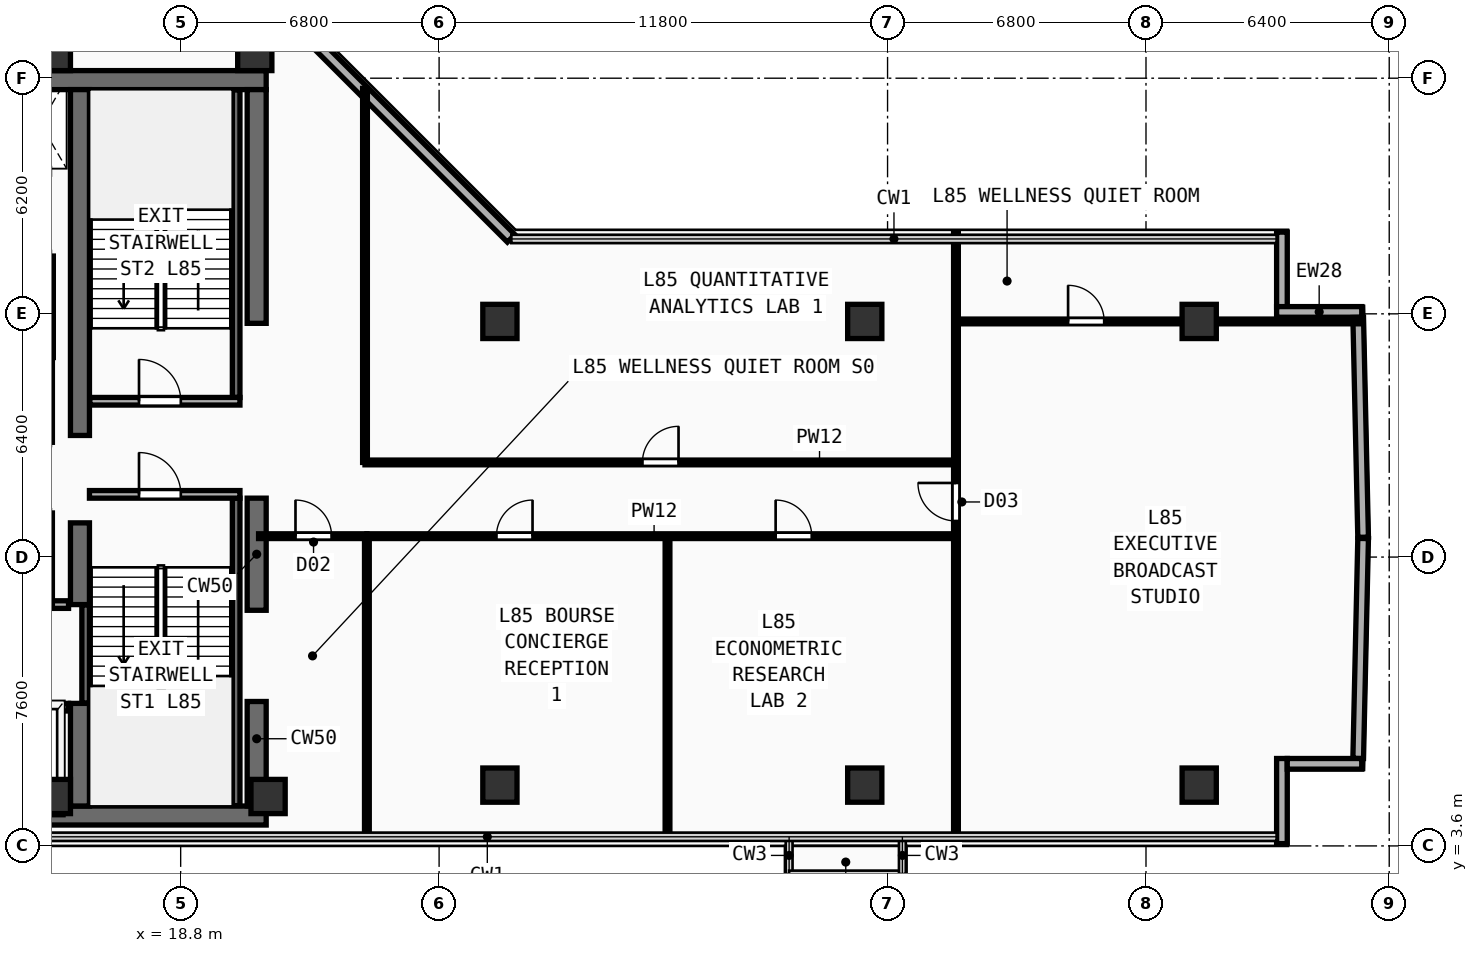
"""IFC4 building model, lengths in metres.
Left out: names, types, materials, properties, quantities, classifications, styles, units other than length and angle.
Written with IfcOpenShell. Run it as: python <this file> out.ifc"""

import sys

from ifc_helpers import new_model, si_unit, direction, frame, frame_2d, origin, origin_2d, place, context, subcontext, project, spatial, rectangle, extrude, element, fill, save


model = new_model("IFC4")
c1 = context("Model", 3, precision=1e-05, world=origin(), true_north=direction((0.0, 1.0)))
c2 = subcontext(c1, "Body", "Model", "MODEL_VIEW")
j1 = project(units=[si_unit("LENGTHUNIT", "METRE"), si_unit("PLANEANGLEUNIT", "RADIAN")], contexts=[c1])
p1 = place(None, origin())
s1 = spatial("IfcSite", under=j1, at=p1, CompositionType="ELEMENT")
p2 = place(p1, origin())
s2 = spatial("IfcBuilding", under=s1, at=p2, CompositionType="ELEMENT")
p3 = place(p2, frame((0.0, 0.0, 331.2)))
s3 = spatial("IfcBuildingStorey", under=s2, at=p3, CompositionType="ELEMENT", Elevation=331.2)
for number, where, z_axis, x_axis in (
    (1, (7.2, 4.4, 0.0), (0.0, 0.0, 1.0), (1.0, 0.0, 0.0)),
    (2, (7.2, 23.75, 0.0), (0.0, 0.0, 1.0), (1.0, 0.0, 0.0)),
):
    element("IfcWall", number, at=place(p3, frame(where, z_axis=z_axis, x_axis=x_axis)), inside=s3, PredefinedType="SHEAR", context=c2, shape_type="SweptSolid", body=[
        extrude(rectangle(XDim=13.85, YDim=0.5, at=frame_2d((6.925, 0.0))), origin(), (0.0, 0.0, 1.0), 3.56),
    ])
p4 = place(p3, frame((20.8, 4.65, 0.0), z_axis=(0.0, 0.0, 1.0), x_axis=(0.0, 1.0, 0.0)))
e3 = element("IfcWall", 3, at=p4, inside=s3, PredefinedType="SHEAR", context=c2, shape_type="SweptSolid", body=[
    extrude(rectangle(XDim=2.75, YDim=0.5, at=frame_2d((1.375, 0.0))), origin(), (0.0, 0.0, 1.0), 3.56),
])
p5 = place(p3, frame((20.8, 9.8, 0.0), z_axis=(0.0, 0.0, 1.0), x_axis=(0.0, 1.0, 0.0)))
e4 = element("IfcWall", 4, at=p5, inside=s3, PredefinedType="SHEAR", context=c2, shape_type="SweptSolid", body=[
    extrude(rectangle(XDim=2.95, YDim=0.5, at=frame_2d((1.475, 0.0))), origin(), (0.0, 0.0, 1.0), 3.56),
])
p6 = place(p3, frame((20.8, 17.35, 0.0), z_axis=(0.0, 0.0, 1.0), x_axis=(0.0, 1.0, 0.0)))
e5 = element("IfcWall", 5, at=p6, inside=s3, PredefinedType="SHEAR", context=c2, shape_type="SweptSolid", body=[
    extrude(rectangle(XDim=6.15, YDim=0.5, at=frame_2d((3.075, 0.0))), origin(), (0.0, 0.0, 1.0), 3.56),
])
p7 = place(p3, frame((16.15, 4.65, 0.0), z_axis=(0.0, 0.0, 1.0), x_axis=(0.0, 1.0, 0.0)))
e6 = element("IfcWall", 6, at=p7, inside=s3, PredefinedType="SHEAR", context=c2, shape_type="SweptSolid", body=[
    extrude(rectangle(XDim=2.7, YDim=0.5, at=frame_2d((1.35, 0.0))), origin(), (0.0, 0.0, 1.0), 3.56),
])
p8 = place(p3, frame((16.15, 9.95, 0.0), z_axis=(0.0, 0.0, 1.0), x_axis=(0.0, 1.0, 0.0)))
e7 = element("IfcWall", 7, at=p8, inside=s3, PredefinedType="SHEAR", context=c2, shape_type="SweptSolid", body=[
    extrude(rectangle(XDim=2.15, YDim=0.5, at=frame_2d((1.075, 0.0))), origin(), (0.0, 0.0, 1.0), 3.56),
])
p9 = place(p3, frame((16.15, 14.4, 0.0), z_axis=(0.0, 0.0, 1.0), x_axis=(0.0, 1.0, 0.0)))
e8 = element("IfcWall", 8, at=p9, inside=s3, PredefinedType="SHEAR", context=c2, shape_type="SweptSolid", body=[
    extrude(rectangle(XDim=9.1, YDim=0.5, at=frame_2d((4.55, 0.0))), origin(), (0.0, 0.0, 1.0), 3.56),
])
for number, where, z_axis, x_axis in (
    (9, (15.45, 4.9, 0.0), (0.0, 0.0, 1.0), (1.0, 0.0, 0.0)),
    (10, (21.1, 4.9, 0.0), (0.0, 0.0, 1.0), (1.0, 0.0, 0.0)),
    (11, (15.45, 24.45, 0.0), (0.0, 0.0, 1.0), (1.0, 0.0, 0.0)),
    (12, (20.75, 24.45, 0.0), (0.0, 0.0, 1.0), (1.0, 0.0, 0.0)),
    (13, (27.2, 5.2, 0.0), (0.0, 0.0, 1.0), (1.0, 0.0, 0.0)),
    (14, (36.8, 5.2, 0.0), (0.0, 0.0, 1.0), (1.0, 0.0, 0.0)),
    (15, (45.6, 5.2, 0.0), (0.0, 0.0, 1.0), (1.0, 0.0, 0.0)),
    (16, (27.2, 17.4, 0.0), (0.0, 0.0, 1.0), (1.0, 0.0, 0.0)),
    (17, (36.8, 17.4, 0.0), (0.0, 0.0, 1.0), (1.0, 0.0, 0.0)),
    (18, (45.6, 17.4, 0.0), (0.0, 0.0, 1.0), (1.0, 0.0, 0.0)),
):
    element("IfcColumn", number, at=place(p3, frame(where, z_axis=z_axis, x_axis=x_axis)), inside=s3, PredefinedType="COLUMN", context=c2, shape_type="SweptSolid", body=[
        extrude(rectangle(XDim=0.9, YDim=0.9, at=origin_2d()), origin(), (0.0, 0.0, 1.0), 3.56),
    ])
p10 = place(p3, frame((47.777, 3.66, 0.0), z_axis=(0.0, 0.0, 1.0), x_axis=(0.0, 1.0, 0.0)))
e19 = element("IfcWall", 19, at=p10, inside=s3, PredefinedType="SOLIDWALL", context=c2, shape_type="SweptSolid", body=[
    extrude(rectangle(XDim=2.24, YDim=0.28, at=frame_2d((1.12, 0.0))), origin(), (0.0, 0.0, 1.0), 3.56),
])
p11 = place(p3, frame((47.917, 5.76, 0.0), z_axis=(0.0, 0.0, 1.0), x_axis=(1.0, 0.0, 0.0)))
e20 = element("IfcWall", 20, at=p11, inside=s3, PredefinedType="SOLIDWALL", context=c2, shape_type="SweptSolid", body=[
    extrude(rectangle(XDim=1.96, YDim=0.28, at=frame_2d((0.98, 0.0))), origin(), (0.0, 0.0, 1.0), 3.56),
])
p12 = place(p3, frame((47.777, 17.775, 0.0), z_axis=(0.0, 0.0, 1.0), x_axis=(0.0, 1.0, 0.0)))
e21 = element("IfcWall", 21, at=p12, inside=s3, PredefinedType="SOLIDWALL", context=c2, shape_type="SweptSolid", body=[
    extrude(rectangle(XDim=1.975, YDim=0.28, at=frame_2d((0.988, 0.0))), origin(), (0.0, 0.0, 1.0), 3.56),
])
p13 = place(p3, frame((47.637, 17.65, 0.0), z_axis=(0.0, 0.0, 1.0), x_axis=(1.0, 0.0, 0.0)))
e22 = element("IfcWall", 22, at=p13, inside=s3, PredefinedType="SOLIDWALL", context=c2, shape_type="SweptSolid", body=[
    extrude(rectangle(XDim=2.24, YDim=0.28, at=frame_2d((1.12, 0.0))), origin(), (0.0, 0.0, 1.0), 3.56),
])
p14 = place(p3, frame((27.496, 19.585, 0.0), z_axis=(0.0, 0.0, 1.0), x_axis=(-0.707106781187, 0.707106781187, 0.0)))
e23 = element("IfcWall", 23, at=p14, inside=s3, PredefinedType="SOLIDWALL", context=c2, shape_type="SweptSolid", body=[
    extrude(rectangle(XDim=9.207, YDim=0.28, at=frame_2d((4.603, 0.0))), origin(), (0.0, 0.0, 1.0), 3.56),
])
p15 = place(p3, frame((49.784, 5.904, 0.0), z_axis=(0.0, 0.0, 1.0), x_axis=(0.022361051613, 0.999749960425, 0.0)))
e24 = element("IfcWall", 24, at=p15, inside=s3, PredefinedType="SOLIDWALL", context=c2, shape_type="SweptSolid", body=[
    extrude(rectangle(XDim=5.787, YDim=0.28, at=frame_2d((2.893, 0.0))), origin(), (0.0, 0.0, 1.0), 3.56),
])
p16 = place(p3, frame((49.913, 11.722, 0.0), z_axis=(0.0, 0.0, 1.0), x_axis=(-0.022360108461, 0.99974998152, 0.0)))
e25 = element("IfcWall", 25, at=p16, inside=s3, PredefinedType="SOLIDWALL", context=c2, shape_type="SweptSolid", body=[
    extrude(rectangle(XDim=5.787, YDim=0.28, at=frame_2d((2.894, 0.0))), origin(), (0.0, 0.0, 1.0), 3.56),
])
p17 = place(p3, frame((16.3, 7.36, 0.0), z_axis=(0.0, 0.0, 1.0), x_axis=(0.0, 1.0, 0.0)))
e26 = element("IfcWall", 26, at=p17, inside=s3, PredefinedType="SHEAR", context=c2, shape_type="SweptSolid", body=[
    extrude(rectangle(XDim=2.58, YDim=0.2, at=frame_2d((1.29, 0.0))), origin(), (0.0, 0.0, 1.0), 3.56),
])
p18 = place(p3, frame((20.26, 4.66, 0.0), z_axis=(0.0, 0.0, 1.0), x_axis=(0.0, 1.0, 0.0)))
e27 = element("IfcWall", 27, at=p18, inside=s3, PredefinedType="SHEAR", context=c2, shape_type="SweptSolid", body=[
    extrude(rectangle(XDim=8.09, YDim=0.2, at=frame_2d((4.045, 0.0))), origin(), (0.0, 0.0, 1.0), 3.56),
])
p19 = place(p3, frame((16.4, 12.85, 0.0), z_axis=(0.0, 0.0, 1.0), x_axis=(1.0, 0.0, 0.0)))
e28 = element("IfcWall", 28, at=p19, inside=s3, PredefinedType="PARTITIONING", context=c2, shape_type="SweptSolid", body=[
    extrude(rectangle(XDim=3.96, YDim=0.2, at=frame_2d((1.98, 0.0))), origin(), (0.0, 0.0, 1.0), 3.56),
])
p20 = place(p19, frame((1.304, 0.0, 0.0)))
e29 = element("IfcOpeningElement", 29, at=p20, cuts=e28, PredefinedType="OPENING", context=c2, shape_type="SweptSolid", body=[
    extrude(rectangle(XDim=1.1, YDim=2.2, at=frame_2d((0.55, 1.1))), frame((0.0, 0.11, 0.0), z_axis=(0.0, -1.0, 0.0), x_axis=(1.0, 0.0, 0.0)), (0.0, 0.0, 1.0), 0.22),
])
p21 = place(p3, frame((20.26, 15.4, 0.0), z_axis=(0.0, 0.0, 1.0), x_axis=(0.0, 1.0, 0.0)))
e30 = element("IfcWall", 30, at=p21, inside=s3, PredefinedType="SHEAR", context=c2, shape_type="SweptSolid", body=[
    extrude(rectangle(XDim=8.09, YDim=0.2, at=frame_2d((4.045, 0.0))), origin(), (0.0, 0.0, 1.0), 3.56),
])
p22 = place(p3, frame((16.41, 15.3, 0.0), z_axis=(0.0, 0.0, 1.0), x_axis=(1.0, 0.0, 0.0)))
e31 = element("IfcWall", 31, at=p22, inside=s3, PredefinedType="PARTITIONING", context=c2, shape_type="SweptSolid", body=[
    extrude(rectangle(XDim=3.95, YDim=0.2, at=frame_2d((1.975, 0.0))), origin(), (0.0, 0.0, 1.0), 3.56),
])
p23 = place(p22, frame((1.294, 0.0, 0.0)))
e32 = element("IfcOpeningElement", 32, at=p23, cuts=e31, PredefinedType="OPENING", context=c2, shape_type="SweptSolid", body=[
    extrude(rectangle(XDim=1.1, YDim=2.2, at=frame_2d((0.55, 1.1))), frame((0.0, 0.11, 0.0), z_axis=(0.0, -1.0, 0.0), x_axis=(1.0, 0.0, 0.0)), (0.0, 0.0, 1.0), 0.22),
])
p24 = place(p3, frame((7.5, 7.25, 0.0), z_axis=(0.0, 0.0, 1.0), x_axis=(1.0, 0.0, 0.0)))
e33 = element("IfcWall", 33, at=p24, inside=s3, PredefinedType="PARTITIONING", context=c2, shape_type="SweptSolid", body=[
    extrude(rectangle(XDim=8.35, YDim=0.2, at=frame_2d((4.175, 0.0))), origin(), (0.0, 0.0, 1.0), 3.56),
])
p25 = place(p24, frame((0.53, 0.0, 0.0)))
e34 = element("IfcOpeningElement", 34, at=p25, cuts=e33, PredefinedType="OPENING", context=c2, shape_type="SweptSolid", body=[
    extrude(rectangle(XDim=1.1, YDim=2.2, at=frame_2d((0.55, 1.1))), frame((0.0, 0.11, 0.0), z_axis=(0.0, -1.0, 0.0), x_axis=(1.0, 0.0, 0.0)), (0.0, 0.0, 1.0), 0.22),
])
p26 = place(p24, frame((2.37, 0.0, 0.0)))
e35 = element("IfcOpeningElement", 35, at=p26, cuts=e33, PredefinedType="OPENING", context=c2, shape_type="SweptSolid", body=[
    extrude(rectangle(XDim=1.1, YDim=2.2, at=frame_2d((0.55, 1.1))), frame((0.0, 0.11, 0.0), z_axis=(0.0, -1.0, 0.0), x_axis=(1.0, 0.0, 0.0)), (0.0, 0.0, 1.0), 0.22),
])
p27 = place(p24, frame((4.33, 0.0, 0.0)))
e36 = element("IfcOpeningElement", 36, at=p27, cuts=e33, PredefinedType="OPENING", context=c2, shape_type="SweptSolid", body=[
    extrude(rectangle(XDim=1.1, YDim=2.2, at=frame_2d((0.55, 1.1))), frame((0.0, 0.11, 0.0), z_axis=(0.0, -1.0, 0.0), x_axis=(1.0, 0.0, 0.0)), (0.0, 0.0, 1.0), 0.22),
])
p28 = place(p24, frame((6.5, 0.0, 0.0)))
e37 = element("IfcOpeningElement", 37, at=p28, cuts=e33, PredefinedType="OPENING", context=c2, shape_type="SweptSolid", body=[
    extrude(rectangle(XDim=1.1, YDim=2.2, at=frame_2d((0.55, 1.1))), frame((0.0, 0.11, 0.0), z_axis=(0.0, -1.0, 0.0), x_axis=(1.0, 0.0, 0.0)), (0.0, 0.0, 1.0), 0.22),
])
p29 = place(p3, frame((7.5, 9.95, 0.0), z_axis=(0.0, 0.0, 1.0), x_axis=(1.0, 0.0, 0.0)))
e38 = element("IfcWall", 38, at=p29, inside=s3, PredefinedType="PARTITIONING", context=c2, shape_type="SweptSolid", body=[
    extrude(rectangle(XDim=8.35, YDim=0.2, at=frame_2d((4.175, 0.0))), origin(), (0.0, 0.0, 1.0), 3.56),
])
p30 = place(p3, frame((15.35, 9.95, 0.0), z_axis=(0.0, 0.0, 1.0), x_axis=(0.0, 1.0, 0.0)))
e39 = element("IfcWall", 39, at=p30, inside=s3, PredefinedType="PARTITIONING", context=c2, shape_type="SweptSolid", body=[
    extrude(rectangle(XDim=2.41, YDim=0.15, at=frame_2d((1.205, 0.0))), origin(), (0.0, 0.0, 1.0), 3.56),
])
p31 = place(p3, frame((15.35, 14.22, 0.0), z_axis=(0.0, 0.0, 1.0), x_axis=(0.0, 1.0, 0.0)))
e40 = element("IfcWall", 40, at=p31, inside=s3, PredefinedType="PARTITIONING", context=c2, shape_type="SweptSolid", body=[
    extrude(rectangle(XDim=2.23, YDim=0.15, at=frame_2d((1.115, 0.0))), origin(), (0.0, 0.0, 1.0), 3.56),
])
p32 = place(p3, frame((15.35, 16.45, 0.0), z_axis=(0.0, 0.0, 1.0), x_axis=(0.0, 1.0, 0.0)))
e41 = element("IfcWall", 41, at=p32, inside=s3, PredefinedType="PARTITIONING", context=c2, shape_type="SweptSolid", body=[
    extrude(rectangle(XDim=2.67, YDim=0.2, at=frame_2d((1.335, 0.0))), origin(), (0.0, 0.0, 1.0), 3.56),
])
p33 = place(p3, frame((20.85, 11.75, 0.0), z_axis=(0.0, 0.0, 1.0), x_axis=(1.0, 0.0, 0.0)))
e42 = element("IfcWall", 42, at=p33, inside=s3, PredefinedType="PARTITIONING", context=c2, shape_type="SweptSolid", body=[
    extrude(rectangle(XDim=2.85, YDim=0.125, at=frame_2d((1.425, 0.0))), origin(), (0.0, 0.0, 1.0), 3.56),
])
p34 = place(p33, frame((0.971, 0.0, 0.0)))
e43 = element("IfcOpeningElement", 43, at=p34, cuts=e42, PredefinedType="OPENING", context=c2, shape_type="SweptSolid", body=[
    extrude(rectangle(XDim=0.95, YDim=2.15, at=frame_2d((0.475, 1.075))), frame((0.0, 0.073, 0.0), z_axis=(0.0, -1.0, 0.0), x_axis=(1.0, 0.0, 0.0)), (0.0, 0.0, 1.0), 0.145),
])
p35 = place(p3, frame((23.7, 3.84, 0.0), z_axis=(0.0, 0.0, 1.0), x_axis=(0.0, 1.0, 0.0)))
e44 = element("IfcWall", 44, at=p35, inside=s3, PredefinedType="PARTITIONING", context=c2, shape_type="SweptSolid", body=[
    extrude(rectangle(XDim=7.91, YDim=0.125, at=frame_2d((3.955, 0.0))), origin(), (0.0, 0.0, 1.0), 3.56),
])
p36 = place(p3, frame((23.7, 11.75, 0.0), z_axis=(0.0, 0.0, 1.0), x_axis=(1.0, 0.0, 0.0)))
e45 = element("IfcWall", 45, at=p36, inside=s3, PredefinedType="PARTITIONING", context=c2, shape_type="SweptSolid", body=[
    extrude(rectangle(XDim=15.5, YDim=0.125, at=frame_2d((7.75, 0.0))), origin(), (0.0, 0.0, 1.0), 3.56),
])
p37 = place(p36, frame((3.408, 0.0, 0.0)))
e46 = element("IfcOpeningElement", 46, at=p37, cuts=e45, PredefinedType="OPENING", context=c2, shape_type="SweptSolid", body=[
    extrude(rectangle(XDim=0.95, YDim=2.15, at=frame_2d((0.475, 1.075))), frame((0.0, 0.073, 0.0), z_axis=(0.0, -1.0, 0.0), x_axis=(1.0, 0.0, 0.0)), (0.0, 0.0, 1.0), 0.145),
])
p38 = place(p36, frame((10.755, 0.0, 0.0)))
e47 = element("IfcOpeningElement", 47, at=p38, cuts=e45, PredefinedType="OPENING", context=c2, shape_type="SweptSolid", body=[
    extrude(rectangle(XDim=0.95, YDim=2.15, at=frame_2d((0.475, 1.075))), frame((0.0, 0.073, 0.0), z_axis=(0.0, -1.0, 0.0), x_axis=(1.0, 0.0, 0.0)), (0.0, 0.0, 1.0), 0.145),
])
p39 = place(p3, frame((31.61, 3.84, 0.0), z_axis=(0.0, 0.0, 1.0), x_axis=(0.0, 1.0, 0.0)))
e48 = element("IfcWall", 48, at=p39, inside=s3, PredefinedType="PARTITIONING", context=c2, shape_type="SweptSolid", body=[
    extrude(rectangle(XDim=7.91, YDim=0.125, at=frame_2d((3.955, 0.0))), origin(), (0.0, 0.0, 1.0), 3.56),
])
p40 = place(p3, frame((39.2, 3.84, 0.0), z_axis=(0.0, 0.0, 1.0), x_axis=(0.0, 1.0, 0.0)))
e49 = element("IfcWall", 49, at=p40, inside=s3, PredefinedType="PARTITIONING", context=c2, shape_type="SweptSolid", body=[
    extrude(rectangle(XDim=15.92, YDim=0.125, at=frame_2d((7.96, 0.0))), origin(), (0.0, 0.0, 1.0), 3.56),
])
p41 = place(p40, frame((8.31, 0.0, 0.0)))
e50 = element("IfcOpeningElement", 50, at=p41, cuts=e49, PredefinedType="OPENING", context=c2, shape_type="SweptSolid", body=[
    extrude(rectangle(XDim=1.0, YDim=2.2, at=frame_2d((0.5, 1.1))), frame((0.0, 0.073, 0.0), z_axis=(0.0, -1.0, 0.0), x_axis=(1.0, 0.0, 0.0)), (0.0, 0.0, 1.0), 0.145),
])
p42 = place(p3, frame((39.2, 17.4, 0.0), z_axis=(0.0, 0.0, 1.0), x_axis=(1.0, 0.0, 0.0)))
e51 = element("IfcWall", 51, at=p42, inside=s3, PredefinedType="PARTITIONING", context=c2, shape_type="SweptSolid", body=[
    extrude(rectangle(XDim=10.634, YDim=0.125, at=frame_2d((5.317, 0.0))), origin(), (0.0, 0.0, 1.0), 3.26),
])
p43 = place(p42, frame((2.95, 0.0, 0.0)))
e52 = element("IfcOpeningElement", 52, at=p43, cuts=e51, PredefinedType="OPENING", context=c2, shape_type="SweptSolid", body=[
    extrude(rectangle(XDim=0.95, YDim=2.15, at=frame_2d((0.475, 1.075))), frame((0.0, 0.073, 0.0), z_axis=(0.0, -1.0, 0.0), x_axis=(1.0, 0.0, 0.0)), (0.0, 0.0, 1.0), 0.145),
])
p44 = place(p3, frame((23.65, 13.69, 0.0), z_axis=(0.0, 0.0, 1.0), x_axis=(0.0, 1.0, 0.0)))
e53 = element("IfcWall", 53, at=p44, inside=s3, PredefinedType="PARTITIONING", context=c2, shape_type="SweptSolid", body=[
    extrude(rectangle(XDim=9.841, YDim=0.125, at=frame_2d((4.92, 0.0))), origin(), (0.0, 0.0, 1.0), 3.56),
])
p45 = place(p3, frame((23.65, 13.69, 0.0), z_axis=(0.0, 0.0, 1.0), x_axis=(1.0, 0.0, 0.0)))
e54 = element("IfcWall", 54, at=p45, inside=s3, PredefinedType="PARTITIONING", context=c2, shape_type="SweptSolid", body=[
    extrude(rectangle(XDim=15.55, YDim=0.125, at=frame_2d((7.775, 0.0))), origin(), (0.0, 0.0, 1.0), 3.26),
])
p46 = place(p45, frame((7.3, 0.0, 0.0)))
e55 = element("IfcOpeningElement", 55, at=p46, cuts=e54, PredefinedType="OPENING", context=c2, shape_type="SweptSolid", body=[
    extrude(rectangle(XDim=0.95, YDim=2.15, at=frame_2d((0.475, 1.075))), frame((0.0, 0.073, 0.0), z_axis=(0.0, -1.0, 0.0), x_axis=(1.0, 0.0, 0.0)), (0.0, 0.0, 1.0), 0.145),
])
p47 = place(p20, frame((1.1, 0.0, 0.0), z_axis=(0.0, 0.0, 1.0), x_axis=(-1.0, 0.0, 0.0)))
e56 = element("IfcDoor", 56, at=p47, inside=s3, OperationType="SINGLE_SWING_RIGHT", PredefinedType="DOOR", context=c2, shape_type="SweptSolid", body=[
    extrude(rectangle(XDim=1.1, YDim=2.2, at=frame_2d((0.55, 1.1))), frame((0.0, 0.025, 0.0), z_axis=(0.0, -1.0, 0.0), x_axis=(1.0, 0.0, 0.0)), (0.0, 0.0, 1.0), 0.05),
])
fill(e29, e56)
p48 = place(p23, origin())
e57 = element("IfcDoor", 57, at=p48, inside=s3, OperationType="SINGLE_SWING_LEFT", PredefinedType="DOOR", context=c2, shape_type="SweptSolid", body=[
    extrude(rectangle(XDim=1.1, YDim=2.2, at=frame_2d((0.55, 1.1))), frame((0.0, 0.025, 0.0), z_axis=(0.0, -1.0, 0.0), x_axis=(1.0, 0.0, 0.0)), (0.0, 0.0, 1.0), 0.05),
])
fill(e32, e57)
p49 = place(p34, origin())
e58 = element("IfcDoor", 58, at=p49, inside=s3, OperationType="SINGLE_SWING_LEFT", PredefinedType="DOOR", context=c2, shape_type="SweptSolid", body=[
    extrude(rectangle(XDim=0.95, YDim=2.15, at=frame_2d((0.475, 1.075))), frame((0.0, 0.025, 0.0), z_axis=(0.0, -1.0, 0.0), x_axis=(1.0, 0.0, 0.0)), (0.0, 0.0, 1.0), 0.05),
])
fill(e43, e58)
p50 = place(p37, origin())
e59 = element("IfcDoor", 59, at=p50, inside=s3, OperationType="SINGLE_SWING_RIGHT", PredefinedType="DOOR", context=c2, shape_type="SweptSolid", body=[
    extrude(rectangle(XDim=0.95, YDim=2.15, at=frame_2d((0.475, 1.075))), frame((0.0, 0.025, 0.0), z_axis=(0.0, -1.0, 0.0), x_axis=(1.0, 0.0, 0.0)), (0.0, 0.0, 1.0), 0.05),
])
fill(e46, e59)
p51 = place(p38, origin())
e60 = element("IfcDoor", 60, at=p51, inside=s3, OperationType="SINGLE_SWING_LEFT", PredefinedType="DOOR", context=c2, shape_type="SweptSolid", body=[
    extrude(rectangle(XDim=0.95, YDim=2.15, at=frame_2d((0.475, 1.075))), frame((0.0, 0.025, 0.0), z_axis=(0.0, -1.0, 0.0), x_axis=(1.0, 0.0, 0.0)), (0.0, 0.0, 1.0), 0.05),
])
fill(e47, e60)
p52 = place(p41, origin())
e61 = element("IfcDoor", 61, at=p52, inside=s3, OperationType="SINGLE_SWING_RIGHT", PredefinedType="DOOR", context=c2, shape_type="SweptSolid", body=[
    extrude(rectangle(XDim=1.0, YDim=2.2, at=frame_2d((0.5, 1.1))), frame((0.0, 0.025, 0.0), z_axis=(0.0, -1.0, 0.0), x_axis=(1.0, 0.0, 0.0)), (0.0, 0.0, 1.0), 0.05),
])
fill(e50, e61)
p53 = place(p43, origin())
e62 = element("IfcDoor", 62, at=p53, inside=s3, OperationType="SINGLE_SWING_LEFT", PredefinedType="DOOR", context=c2, shape_type="SweptSolid", body=[
    extrude(rectangle(XDim=0.95, YDim=2.15, at=frame_2d((0.475, 1.075))), frame((0.0, 0.025, 0.0), z_axis=(0.0, -1.0, 0.0), x_axis=(1.0, 0.0, 0.0)), (0.0, 0.0, 1.0), 0.05),
])
fill(e52, e62)
p54 = place(p46, origin())
e63 = element("IfcDoor", 63, at=p54, inside=s3, OperationType="SINGLE_SWING_RIGHT", PredefinedType="DOOR", context=c2, shape_type="SweptSolid", body=[
    extrude(rectangle(XDim=0.95, YDim=2.15, at=frame_2d((0.475, 1.075))), frame((0.0, 0.025, 0.0), z_axis=(0.0, -1.0, 0.0), x_axis=(1.0, 0.0, 0.0)), (0.0, 0.0, 1.0), 0.05),
])
fill(e55, e63)
save(model, sys.argv[1])
